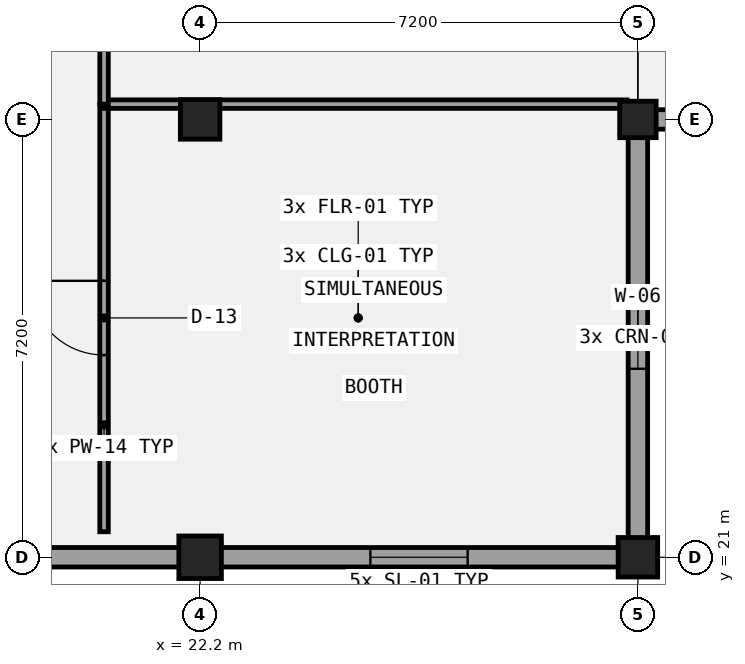
"""IFC4 building model, lengths in metres.
Left out: names, types, materials, properties, quantities, classifications, styles, units other than length and angle.
Written with IfcOpenShell. Run it as: python <this file> out.ifc"""

import sys

from ifc_helpers import new_model, si_unit, direction, frame, frame_2d, origin, origin_2d, place, context, subcontext, project, spatial, rectangle, extrude, element, fill, save


model = new_model("IFC4")
c1 = context("Model", 3, precision=1e-05, world=origin(), true_north=direction((0.0, 1.0)))
c2 = subcontext(c1, "Body", "Model", "MODEL_VIEW")
j1 = project(units=[si_unit("LENGTHUNIT", "METRE"), si_unit("PLANEANGLEUNIT", "RADIAN")], contexts=[c1])
p1 = place(None, origin())
s1 = spatial("IfcSite", under=j1, at=p1, CompositionType="ELEMENT")
p2 = place(p1, origin())
s2 = spatial("IfcBuilding", under=s1, at=p2, CompositionType="ELEMENT")
p3 = place(p2, frame((0.0, 0.0, 9.6)))
s3 = spatial("IfcBuildingStorey", under=s2, at=p3, CompositionType="ELEMENT", Elevation=9.6)
p4 = place(p3, frame((22.2, 21.0, 0.0), z_axis=(0.0, 0.0, 1.0), x_axis=(1.0, 0.0, 0.0)))
e1 = element("IfcColumn", 1, at=p4, inside=s3, PredefinedType="COLUMN", context=c2, shape_type="SweptSolid", body=[
    extrude(rectangle(XDim=0.7, YDim=0.7, at=origin_2d()), origin(), (0.0, 0.0, 1.0), 4.2),
])
for number, where, z_axis, x_axis in (
    (2, (22.2, 28.2, 0.0), (0.0, 0.0, 1.0), (1.0, 0.0, 0.0)),
    (3, (29.4, 21.0, 0.0), (0.0, 0.0, 1.0), (1.0, 0.0, 0.0)),
):
    element("IfcColumn", number, at=place(p3, frame(where, z_axis=z_axis, x_axis=x_axis)), inside=s3, PredefinedType="COLUMN", context=c2, shape_type="SweptSolid", body=[
        extrude(rectangle(XDim=0.65, YDim=0.65, at=origin_2d()), origin(), (0.0, 0.0, 1.0), 4.2),
    ])
p5 = place(p3, frame((29.4, 28.2, 0.0), z_axis=(0.0, 0.0, 1.0), x_axis=(1.0, 0.0, 0.0)))
e4 = element("IfcColumn", 4, at=p5, inside=s3, PredefinedType="COLUMN", context=c2, shape_type="SweptSolid", body=[
    extrude(rectangle(XDim=0.6, YDim=0.6, at=origin_2d()), origin(), (0.0, 0.0, 1.0), 4.2),
])
p6 = place(p3, frame((7.64, 21.0, 0.0), z_axis=(0.0, 0.0, 1.0), x_axis=(1.0, 0.0, 0.0)))
e5 = element("IfcWall", 5, at=p6, inside=s3, PredefinedType="SOLIDWALL", context=c2, shape_type="SweptSolid", body=[
    extrude(rectangle(XDim=21.92, YDim=0.32, at=frame_2d((10.96, 0.0))), origin(), (0.0, 0.0, 1.0), 2.94),
])
p7 = place(p6, frame((2.96, 0.0, 1.0)))
e6 = element("IfcOpeningElement", 6, at=p7, cuts=e5, PredefinedType="OPENING", context=c2, shape_type="SweptSolid", body=[
    extrude(rectangle(XDim=1.6, YDim=1.65, at=frame_2d((0.8, 0.825))), frame((0.0, 0.17, 0.0), z_axis=(0.0, -1.0, 0.0), x_axis=(1.0, 0.0, 0.0)), (0.0, 0.0, 1.0), 0.34),
])
p8 = place(p6, frame((10.16, 0.0, 1.0)))
e7 = element("IfcOpeningElement", 7, at=p8, cuts=e5, PredefinedType="OPENING", context=c2, shape_type="SweptSolid", body=[
    extrude(rectangle(XDim=1.6, YDim=1.65, at=frame_2d((0.8, 0.825))), frame((0.0, 0.17, 0.0), z_axis=(0.0, -1.0, 0.0), x_axis=(1.0, 0.0, 0.0)), (0.0, 0.0, 1.0), 0.34),
])
p9 = place(p6, frame((17.36, 0.0, 1.0)))
e8 = element("IfcOpeningElement", 8, at=p9, cuts=e5, PredefinedType="OPENING", context=c2, shape_type="SweptSolid", body=[
    extrude(rectangle(XDim=1.6, YDim=1.65, at=frame_2d((0.8, 0.825))), frame((0.0, 0.17, 0.0), z_axis=(0.0, -1.0, 0.0), x_axis=(1.0, 0.0, 0.0)), (0.0, 0.0, 1.0), 0.34),
])
p10 = place(p3, frame((29.4, 21.16, 0.0), z_axis=(0.0, 0.0, 1.0), x_axis=(0.0, 1.0, 0.0)))
e9 = element("IfcWall", 9, at=p10, inside=s3, PredefinedType="SOLIDWALL", context=c2, shape_type="SweptSolid", body=[
    extrude(rectangle(XDim=6.88, YDim=0.32, at=frame_2d((3.44, 0.0))), origin(), (0.0, 0.0, 1.0), 3.14),
])
p11 = place(p10, frame((2.94, 0.0, 1.0)))
e10 = element("IfcOpeningElement", 10, at=p11, cuts=e9, PredefinedType="OPENING", context=c2, shape_type="SweptSolid", body=[
    extrude(rectangle(XDim=1.0, YDim=1.4, at=frame_2d((0.5, 0.7))), frame((0.0, 0.17, 0.0), z_axis=(0.0, -1.0, 0.0), x_axis=(1.0, 0.0, 0.0)), (0.0, 0.0, 1.0), 0.34),
])
p12 = place(p3, frame((29.24, 28.2, 0.0), z_axis=(0.0, 0.0, 1.0), x_axis=(1.0, 0.0, 0.0)))
e11 = element("IfcWall", 11, at=p12, inside=s3, PredefinedType="SOLIDWALL", context=c2, shape_type="SweptSolid", body=[
    extrude(rectangle(XDim=50.37, YDim=0.32, at=frame_2d((25.185, 0.0))), origin(), (0.0, 0.0, 1.0), 2.94),
])
p13 = place(p12, frame((2.86, 0.0, 1.0)))
e12 = element("IfcOpeningElement", 12, at=p13, cuts=e11, PredefinedType="OPENING", context=c2, shape_type="SweptSolid", body=[
    extrude(rectangle(XDim=1.8, YDim=1.65, at=frame_2d((0.9, 0.825))), frame((0.0, 0.17, 0.0), z_axis=(0.0, -1.0, 0.0), x_axis=(1.0, 0.0, 0.0)), (0.0, 0.0, 1.0), 0.34),
])
p14 = place(p12, frame((10.06, 0.0, 1.0)))
e13 = element("IfcOpeningElement", 13, at=p14, cuts=e11, PredefinedType="OPENING", context=c2, shape_type="SweptSolid", body=[
    extrude(rectangle(XDim=1.8, YDim=1.65, at=frame_2d((0.9, 0.825))), frame((0.0, 0.17, 0.0), z_axis=(0.0, -1.0, 0.0), x_axis=(1.0, 0.0, 0.0)), (0.0, 0.0, 1.0), 0.34),
])
p15 = place(p12, frame((17.26, 0.0, 1.0)))
e14 = element("IfcOpeningElement", 14, at=p15, cuts=e11, PredefinedType="OPENING", context=c2, shape_type="SweptSolid", body=[
    extrude(rectangle(XDim=1.8, YDim=1.65, at=frame_2d((0.9, 0.825))), frame((0.0, 0.17, 0.0), z_axis=(0.0, -1.0, 0.0), x_axis=(1.0, 0.0, 0.0)), (0.0, 0.0, 1.0), 0.34),
])
p16 = place(p12, frame((24.46, 0.0, 1.0)))
e15 = element("IfcOpeningElement", 15, at=p16, cuts=e11, PredefinedType="OPENING", context=c2, shape_type="SweptSolid", body=[
    extrude(rectangle(XDim=1.8, YDim=1.65, at=frame_2d((0.9, 0.825))), frame((0.0, 0.17, 0.0), z_axis=(0.0, -1.0, 0.0), x_axis=(1.0, 0.0, 0.0)), (0.0, 0.0, 1.0), 0.34),
])
p17 = place(p12, frame((31.66, 0.0, 1.0)))
e16 = element("IfcOpeningElement", 16, at=p17, cuts=e11, PredefinedType="OPENING", context=c2, shape_type="SweptSolid", body=[
    extrude(rectangle(XDim=1.8, YDim=1.65, at=frame_2d((0.9, 0.825))), frame((0.0, 0.17, 0.0), z_axis=(0.0, -1.0, 0.0), x_axis=(1.0, 0.0, 0.0)), (0.0, 0.0, 1.0), 0.34),
])
p18 = place(p12, frame((38.86, 0.0, 1.0)))
e17 = element("IfcOpeningElement", 17, at=p18, cuts=e11, PredefinedType="OPENING", context=c2, shape_type="SweptSolid", body=[
    extrude(rectangle(XDim=1.8, YDim=1.65, at=frame_2d((0.9, 0.825))), frame((0.0, 0.17, 0.0), z_axis=(0.0, -1.0, 0.0), x_axis=(1.0, 0.0, 0.0)), (0.0, 0.0, 1.0), 0.34),
])
p19 = place(p12, frame((45.965, 0.0, 1.0)))
e18 = element("IfcOpeningElement", 18, at=p19, cuts=e11, PredefinedType="OPENING", context=c2, shape_type="SweptSolid", body=[
    extrude(rectangle(XDim=1.8, YDim=1.65, at=frame_2d((0.9, 0.825))), frame((0.0, 0.17, 0.0), z_axis=(0.0, -1.0, 0.0), x_axis=(1.0, 0.0, 0.0)), (0.0, 0.0, 1.0), 0.34),
])
p20 = place(p3, frame((20.62, 21.42, 0.0), z_axis=(0.0, 0.0, 1.0), x_axis=(0.0, 1.0, 0.0)))
e19 = element("IfcWall", 19, at=p20, inside=s3, PredefinedType="PARTITIONING", context=c2, shape_type="SweptSolid", body=[
    extrude(rectangle(XDim=7.032, YDim=0.14, at=frame_2d((3.516, 0.0))), origin(), (0.0, 0.0, 1.0), 3.94),
])
p21 = place(p20, frame((2.906, 0.0, 0.0)))
e20 = element("IfcOpeningElement", 20, at=p21, cuts=e19, PredefinedType="OPENING", context=c2, shape_type="SweptSolid", body=[
    extrude(rectangle(XDim=1.22, YDim=2.1, at=frame_2d((0.61, 1.05))), frame((0.0, 0.08, 0.0), z_axis=(0.0, -1.0, 0.0), x_axis=(1.0, 0.0, 0.0)), (0.0, 0.0, 1.0), 0.16),
])
p22 = place(p3, frame((20.62, 28.452, 0.0), z_axis=(0.0, 0.0, 1.0), x_axis=(1.0, 0.0, 0.0)))
e21 = element("IfcWall", 21, at=p22, inside=s3, PredefinedType="PARTITIONING", context=c2, shape_type="SweptSolid", body=[
    extrude(rectangle(XDim=8.6, YDim=0.14, at=frame_2d((4.3, 0.0))), origin(), (0.0, 0.0, 1.0), 2.74),
])
p23 = place(p3, frame((20.62, 28.452, 0.0), z_axis=(0.0, 0.0, 1.0), x_axis=(0.0, 1.0, 0.0)))
e22 = element("IfcWall", 22, at=p23, inside=s3, PredefinedType="PARTITIONING", context=c2, shape_type="SweptSolid", body=[
    extrude(rectangle(XDim=7.032, YDim=0.14, at=frame_2d((3.516, 0.0))), origin(), (0.0, 0.0, 1.0), 3.94),
])
p24 = place(p23, frame((2.906, 0.0, 0.0)))
e23 = element("IfcOpeningElement", 23, at=p24, cuts=e22, PredefinedType="OPENING", context=c2, shape_type="SweptSolid", body=[
    extrude(rectangle(XDim=1.22, YDim=2.22, at=frame_2d((0.61, 1.11))), frame((0.0, 0.08, 0.0), z_axis=(0.0, -1.0, 0.0), x_axis=(1.0, 0.0, 0.0)), (0.0, 0.0, 1.0), 0.16),
])
p25 = place(p9, origin())
e24 = element("IfcWindow", 24, at=p25, inside=s3, PartitioningType="SINGLE_PANEL", PredefinedType="WINDOW", context=c2, shape_type="SweptSolid", body=[
    extrude(rectangle(XDim=1.6, YDim=1.65, at=frame_2d((0.8, 0.825))), frame((0.0, 0.03, 0.0), z_axis=(0.0, -1.0, 0.0), x_axis=(1.0, 0.0, 0.0)), (0.0, 0.0, 1.0), 0.06),
])
fill(e8, e24)
p26 = place(p11, origin())
e25 = element("IfcWindow", 25, at=p26, inside=s3, PartitioningType="SINGLE_PANEL", PredefinedType="WINDOW", context=c2, shape_type="SweptSolid", body=[
    extrude(rectangle(XDim=1.0, YDim=1.4, at=frame_2d((0.5, 0.7))), frame((0.0, 0.03, 0.0), z_axis=(0.0, -1.0, 0.0), x_axis=(1.0, 0.0, 0.0)), (0.0, 0.0, 1.0), 0.06),
])
fill(e10, e25)
p27 = place(p21, origin())
e26 = element("IfcDoor", 26, at=p27, inside=s3, OperationType="SINGLE_SWING_RIGHT", PredefinedType="DOOR", context=c2, shape_type="SweptSolid", body=[
    extrude(rectangle(XDim=1.22, YDim=2.1, at=frame_2d((0.61, 1.05))), frame((0.0, 0.025, 0.0), z_axis=(0.0, -1.0, 0.0), x_axis=(1.0, 0.0, 0.0)), (0.0, 0.0, 1.0), 0.05),
])
fill(e20, e26)
save(model, sys.argv[1])
